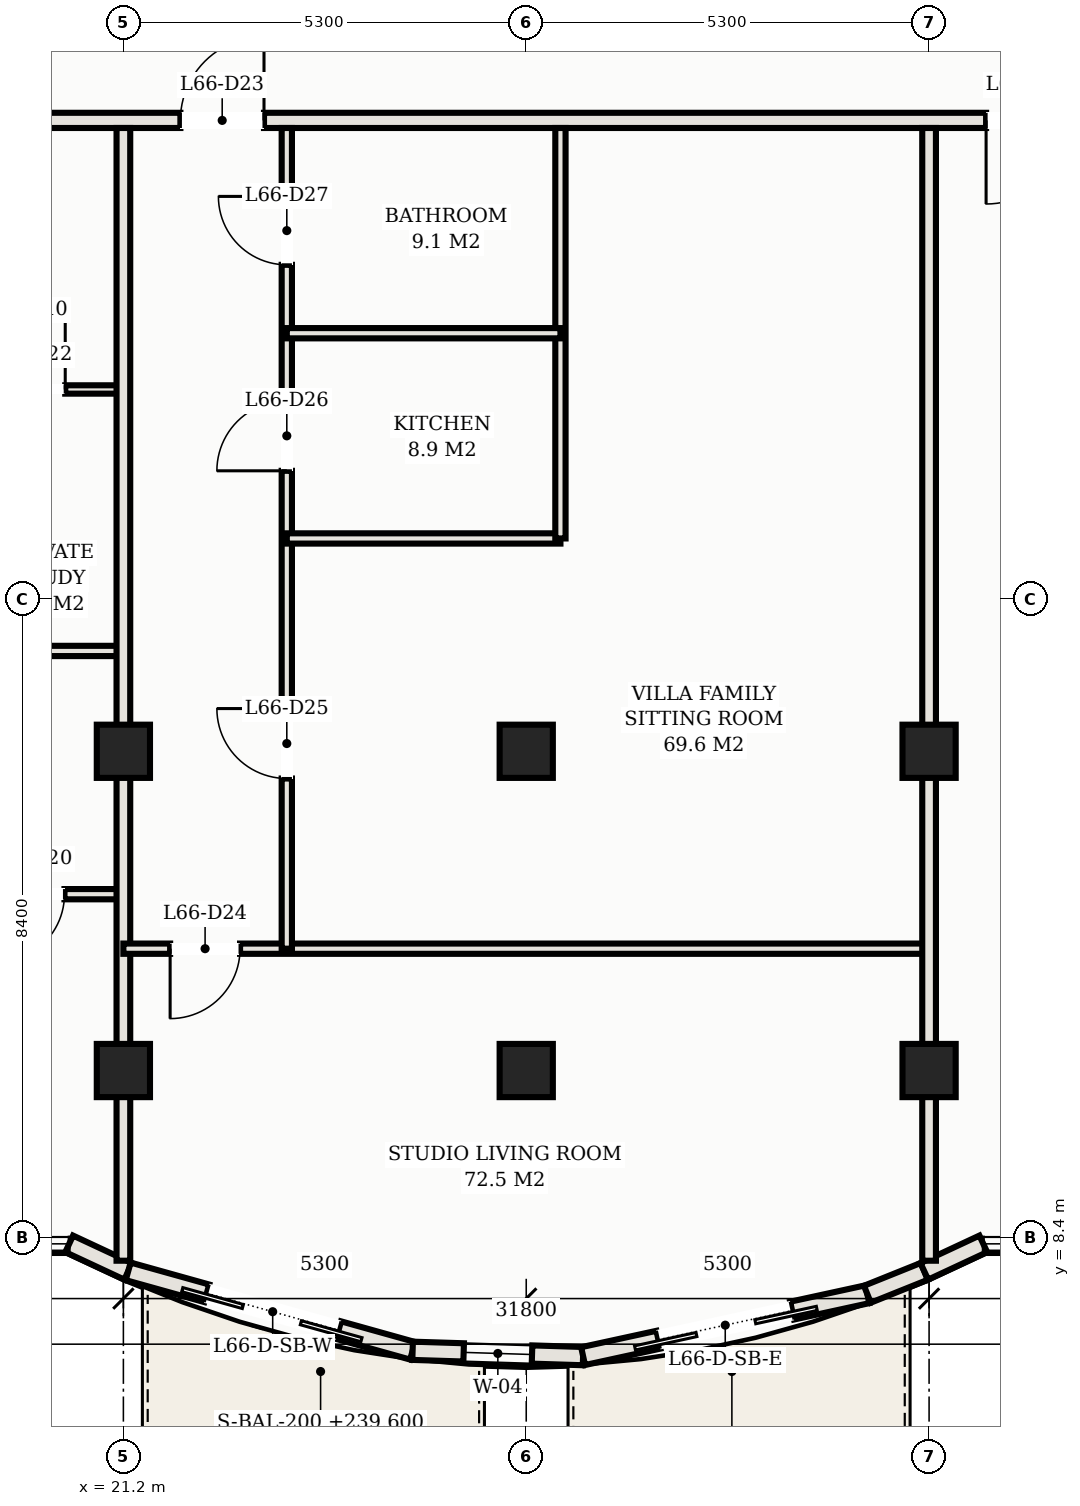
"""IFC4 building model, lengths in metres.
Left out: names, types, materials, properties, quantities, classifications, styles, units other than length and angle.
Written with IfcOpenShell. Run it as: python <this file> out.ifc"""

import sys

from ifc_helpers import new_model, si_unit, direction, frame, frame_2d, origin, origin_2d, place, context, subcontext, project, spatial, rectangle, hollow_rectangle, extrude, element, fill, save


model = new_model("IFC4")
c1 = context("Model", 3, precision=1e-05, world=origin(), true_north=direction((0.0, 1.0)))
c2 = subcontext(c1, "Body", "Model", "MODEL_VIEW")
j1 = project(units=[si_unit("LENGTHUNIT", "METRE"), si_unit("PLANEANGLEUNIT", "RADIAN")], contexts=[c1])
p1 = place(None, origin())
s1 = spatial("IfcSite", under=j1, at=p1, CompositionType="ELEMENT")
p2 = place(p1, origin())
s2 = spatial("IfcBuilding", under=s1, at=p2, CompositionType="ELEMENT")
p3 = place(p2, frame((0.0, 0.0, 239.6)))
s3 = spatial("IfcBuildingStorey", under=s2, at=p3, CompositionType="ELEMENT", Elevation=239.6)
for number, where, z_axis, x_axis in (
    (1, (21.2, 14.8, 0.0), (0.0, 0.0, 1.0), (1.0, 0.0, 0.0)),
    (2, (21.2, 10.6, 0.0), (0.0, 0.0, 1.0), (1.0, 0.0, 0.0)),
    (3, (26.5, 14.8, 0.0), (0.0, 0.0, 1.0), (1.0, 0.0, 0.0)),
    (4, (26.5, 10.6, 0.0), (0.0, 0.0, 1.0), (1.0, 0.0, 0.0)),
    (5, (31.8, 14.8, 0.0), (0.0, 0.0, 1.0), (1.0, 0.0, 0.0)),
    (6, (31.8, 10.6, 0.0), (0.0, 0.0, 1.0), (1.0, 0.0, 0.0)),
):
    element("IfcColumn", number, at=place(p3, frame(where, z_axis=z_axis, x_axis=x_axis)), inside=s3, PredefinedType="COLUMN", context=c2, shape_type="SweptSolid", body=[
        extrude(hollow_rectangle(XDim=0.7, YDim=0.7, WallThickness=0.025, at=origin_2d()), origin(), (0.0, 0.0, 1.0), 3.3),
    ])
p4 = place(p3, frame((20.487, 8.32, 0.0), z_axis=(0.0, 0.0, 1.0), x_axis=(0.906190424584, -0.422869855147, 0.0)))
e7 = element("IfcWall", 7, at=p4, inside=s3, PredefinedType="SOLIDWALL", context=c2, shape_type="SweptSolid", body=[
    extrude(rectangle(XDim=0.856, YDim=0.24, at=frame_2d((0.428, 0.0))), origin(), (0.0, 0.0, 1.0), 3.11),
])
p5 = place(p3, frame((21.263, 7.958, 0.0), z_axis=(0.0, 0.0, 1.0), x_axis=(0.963152398068, -0.268956238255, 0.0)))
e8 = element("IfcWall", 8, at=p5, inside=s3, PredefinedType="SOLIDWALL", context=c2, shape_type="SweptSolid", body=[
    extrude(rectangle(XDim=3.885, YDim=0.24, at=frame_2d((1.942, 0.0))), origin(), (0.0, 0.0, 1.0), 3.11),
])
p6 = place(p5, frame((1.074, 0.0, 0.0)))
e9 = element("IfcOpeningElement", 9, at=p6, cuts=e8, PredefinedType="OPENING", context=c2, shape_type="SweptSolid", body=[
    extrude(rectangle(XDim=1.8, YDim=2.2, at=frame_2d((0.9, 1.1))), frame((0.0, 0.13, 0.0), z_axis=(0.0, -1.0, 0.0), x_axis=(1.0, 0.0, 0.0)), (0.0, 0.0, 1.0), 0.26),
])
p7 = place(p3, frame((25.005, 6.913, 0.0), z_axis=(0.0, 0.0, 1.0), x_axis=(0.99951250052, -0.031221167572, 0.0)))
e10 = element("IfcWall", 10, at=p7, inside=s3, PredefinedType="SOLIDWALL", context=c2, shape_type="SweptSolid", body=[
    extrude(rectangle(XDim=2.244, YDim=0.24, at=frame_2d((1.122, 0.0))), origin(), (0.0, 0.0, 1.0), 3.11),
])
p8 = place(p7, frame((0.672, 0.0, 0.75)))
e11 = element("IfcOpeningElement", 11, at=p8, cuts=e10, PredefinedType="OPENING", context=c2, shape_type="SweptSolid", body=[
    extrude(rectangle(XDim=0.9, YDim=1.2, at=frame_2d((0.45, 0.6))), frame((0.0, 0.13, 0.0), z_axis=(0.0, -1.0, 0.0), x_axis=(1.0, 0.0, 0.0)), (0.0, 0.0, 1.0), 0.26),
])
p9 = place(p3, frame((27.248, 6.843, 0.0), z_axis=(0.0, 0.0, 1.0), x_axis=(0.977126252677, 0.212660025225, 0.0)))
e12 = element("IfcWall", 12, at=p9, inside=s3, PredefinedType="SOLIDWALL", context=c2, shape_type="SweptSolid", body=[
    extrude(rectangle(XDim=3.828, YDim=0.24, at=frame_2d((1.914, 0.0))), origin(), (0.0, 0.0, 1.0), 3.11),
])
p10 = place(p9, frame((1.014, 0.0, 0.0)))
e13 = element("IfcOpeningElement", 13, at=p10, cuts=e12, PredefinedType="OPENING", context=c2, shape_type="SweptSolid", body=[
    extrude(rectangle(XDim=1.8, YDim=2.2, at=frame_2d((0.9, 1.1))), frame((0.0, 0.13, 0.0), z_axis=(0.0, -1.0, 0.0), x_axis=(1.0, 0.0, 0.0)), (0.0, 0.0, 1.0), 0.26),
])
p11 = place(p3, frame((30.988, 7.657, 0.0), z_axis=(0.0, 0.0, 1.0), x_axis=(0.927870589467, 0.372902358805, 0.0)))
e14 = element("IfcWall", 14, at=p11, inside=s3, PredefinedType="SOLIDWALL", context=c2, shape_type="SweptSolid", body=[
    extrude(rectangle(XDim=0.807, YDim=0.24, at=frame_2d((0.404, 0.0))), origin(), (0.0, 0.0, 1.0), 3.11),
])
p12 = place(p3, frame((31.737, 7.958, 0.0), z_axis=(0.0, 0.0, 1.0), x_axis=(0.906190424584, 0.422869855147, 0.0)))
e15 = element("IfcWall", 15, at=p12, inside=s3, PredefinedType="SOLIDWALL", context=c2, shape_type="SweptSolid", body=[
    extrude(rectangle(XDim=0.856, YDim=0.24, at=frame_2d((0.428, 0.0))), origin(), (0.0, 0.0, 1.0), 3.11),
])
p13 = place(p3, frame((8.6, 23.1, 0.0), z_axis=(0.0, 0.0, 1.0), x_axis=(1.0, 0.0, 0.0)))
e16 = element("IfcWall", 16, at=p13, inside=s3, PredefinedType="PARTITIONING", context=c2, shape_type="SweptSolid", body=[
    extrude(rectangle(XDim=35.8, YDim=0.2, at=frame_2d((17.9, 0.0))), origin(), (0.0, 0.0, 1.0), 2.45),
])
p14 = place(p13, frame((2.75, 0.0, 0.0)))
e17 = element("IfcOpeningElement", 17, at=p14, cuts=e16, PredefinedType="OPENING", context=c2, shape_type="SweptSolid", body=[
    extrude(rectangle(XDim=1.1, YDim=2.25, at=frame_2d((0.55, 1.125))), frame((0.0, 0.11, 0.0), z_axis=(0.0, -1.0, 0.0), x_axis=(1.0, 0.0, 0.0)), (0.0, 0.0, 1.0), 0.22),
])
p15 = place(p13, frame((13.35, 0.0, 0.0)))
e18 = element("IfcOpeningElement", 18, at=p15, cuts=e16, PredefinedType="OPENING", context=c2, shape_type="SweptSolid", body=[
    extrude(rectangle(XDim=1.1, YDim=2.25, at=frame_2d((0.55, 1.125))), frame((0.0, 0.11, 0.0), z_axis=(0.0, -1.0, 0.0), x_axis=(1.0, 0.0, 0.0)), (0.0, 0.0, 1.0), 0.22),
])
p16 = place(p13, frame((23.95, 0.0, 0.0)))
e19 = element("IfcOpeningElement", 19, at=p16, cuts=e16, PredefinedType="OPENING", context=c2, shape_type="SweptSolid", body=[
    extrude(rectangle(XDim=1.1, YDim=2.25, at=frame_2d((0.55, 1.125))), frame((0.0, 0.11, 0.0), z_axis=(0.0, -1.0, 0.0), x_axis=(1.0, 0.0, 0.0)), (0.0, 0.0, 1.0), 0.22),
])
p17 = place(p13, frame((29.25, 0.0, 0.0)))
e20 = element("IfcOpeningElement", 20, at=p17, cuts=e16, PredefinedType="OPENING", context=c2, shape_type="SweptSolid", body=[
    extrude(rectangle(XDim=1.1, YDim=2.25, at=frame_2d((0.55, 1.125))), frame((0.0, 0.11, 0.0), z_axis=(0.0, -1.0, 0.0), x_axis=(1.0, 0.0, 0.0)), (0.0, 0.0, 1.0), 0.22),
])
p18 = place(p13, frame((0.505, 0.0, 0.0)))
e21 = element("IfcOpeningElement", 21, at=p18, cuts=e16, PredefinedType="OPENING", context=c2, shape_type="SweptSolid", body=[
    extrude(rectangle(XDim=0.9, YDim=2.15, at=frame_2d((0.45, 1.075))), frame((0.0, 0.11, 0.0), z_axis=(0.0, -1.0, 0.0), x_axis=(1.0, 0.0, 0.0)), (0.0, 0.0, 1.0), 0.22),
])
p19 = place(p13, frame((34.395, 0.0, 0.0)))
e22 = element("IfcOpeningElement", 22, at=p19, cuts=e16, PredefinedType="OPENING", context=c2, shape_type="SweptSolid", body=[
    extrude(rectangle(XDim=0.9, YDim=2.15, at=frame_2d((0.45, 1.075))), frame((0.0, 0.11, 0.0), z_axis=(0.0, -1.0, 0.0), x_axis=(1.0, 0.0, 0.0)), (0.0, 0.0, 1.0), 0.22),
])
p20 = place(p3, frame((16.6, 12.92, 0.0), z_axis=(0.0, 0.0, 1.0), x_axis=(1.0, 0.0, 0.0)))
e23 = element("IfcWall", 23, at=p20, inside=s3, PredefinedType="PARTITIONING", context=c2, shape_type="SweptSolid", body=[
    extrude(rectangle(XDim=4.6, YDim=0.135, at=frame_2d((2.3, 0.0))), origin(), (0.0, 0.0, 1.0), 2.45),
])
p21 = place(p20, frame((0.6, 0.0, 0.0)))
e24 = element("IfcOpeningElement", 24, at=p21, cuts=e23, PredefinedType="OPENING", context=c2, shape_type="SweptSolid", body=[
    extrude(rectangle(XDim=0.95, YDim=2.15, at=frame_2d((0.475, 1.075))), frame((0.0, 0.078, 0.0), z_axis=(0.0, -1.0, 0.0), x_axis=(1.0, 0.0, 0.0)), (0.0, 0.0, 1.0), 0.155),
])
p22 = place(p20, frame((2.925, 0.0, 0.0)))
e25 = element("IfcOpeningElement", 25, at=p22, cuts=e23, PredefinedType="OPENING", context=c2, shape_type="SweptSolid", body=[
    extrude(rectangle(XDim=0.9, YDim=2.15, at=frame_2d((0.45, 1.075))), frame((0.0, 0.078, 0.0), z_axis=(0.0, -1.0, 0.0), x_axis=(1.0, 0.0, 0.0)), (0.0, 0.0, 1.0), 0.155),
])
p23 = place(p3, frame((18.75, 16.12, 0.0), z_axis=(0.0, 0.0, 1.0), x_axis=(1.0, 0.0, 0.0)))
e26 = element("IfcWall", 26, at=p23, inside=s3, PredefinedType="PARTITIONING", context=c2, shape_type="SweptSolid", body=[
    extrude(rectangle(XDim=2.45, YDim=0.135, at=frame_2d((1.225, 0.0))), origin(), (0.0, 0.0, 1.0), 2.45),
])
p24 = place(p3, frame((18.75, 19.56, 0.0), z_axis=(0.0, 0.0, 1.0), x_axis=(1.0, 0.0, 0.0)))
e27 = element("IfcWall", 27, at=p24, inside=s3, PredefinedType="MOVABLE", context=c2, shape_type="SweptSolid", body=[
    extrude(rectangle(XDim=2.45, YDim=0.11, at=frame_2d((1.225, 0.0))), origin(), (0.0, 0.0, 1.0), 2.45),
])
p25 = place(p24, frame((0.765, 0.0, 0.0)))
e28 = element("IfcOpeningElement", 28, at=p25, cuts=e27, PredefinedType="OPENING", context=c2, shape_type="SweptSolid", body=[
    extrude(rectangle(XDim=0.92, YDim=2.15, at=frame_2d((0.46, 1.075))), frame((0.0, 0.065, 0.0), z_axis=(0.0, -1.0, 0.0), x_axis=(1.0, 0.0, 0.0)), (0.0, 0.0, 1.0), 0.13),
])
p26 = place(p3, frame((21.2, 8.098, 0.0), z_axis=(0.0, 0.0, 1.0), x_axis=(0.0, 1.0, 0.0)))
e29 = element("IfcWall", 29, at=p26, inside=s3, PredefinedType="PARTITIONING", context=c2, shape_type="SweptSolid", body=[
    extrude(rectangle(XDim=14.902, YDim=0.18, at=frame_2d((7.451, 0.0))), origin(), (0.0, 0.0, 1.0), 2.45),
])
p27 = place(p3, frame((21.2, 12.203, 0.0), z_axis=(0.0, 0.0, 1.0), x_axis=(1.0, 0.0, 0.0)))
e30 = element("IfcWall", 30, at=p27, inside=s3, PredefinedType="PARTITIONING", context=c2, shape_type="SweptSolid", body=[
    extrude(rectangle(XDim=10.6, YDim=0.135, at=frame_2d((5.3, 0.0))), origin(), (0.0, 0.0, 1.0), 2.45),
])
p28 = place(p27, frame((0.615, 0.0, 0.0)))
e31 = element("IfcOpeningElement", 31, at=p28, cuts=e30, PredefinedType="OPENING", context=c2, shape_type="SweptSolid", body=[
    extrude(rectangle(XDim=0.92, YDim=2.15, at=frame_2d((0.46, 1.075))), frame((0.0, 0.078, 0.0), z_axis=(0.0, -1.0, 0.0), x_axis=(1.0, 0.0, 0.0)), (0.0, 0.0, 1.0), 0.155),
])
p29 = place(p3, frame((23.35, 12.203, 0.0), z_axis=(0.0, 0.0, 1.0), x_axis=(0.0, 1.0, 0.0)))
e32 = element("IfcWall", 32, at=p29, inside=s3, PredefinedType="PARTITIONING", context=c2, shape_type="SweptSolid", body=[
    extrude(rectangle(XDim=10.797, YDim=0.135, at=frame_2d((5.398, 0.0))), origin(), (0.0, 0.0, 1.0), 2.45),
])
p30 = place(p29, frame((2.239, 0.0, 0.0)))
e33 = element("IfcOpeningElement", 33, at=p30, cuts=e32, PredefinedType="OPENING", context=c2, shape_type="SweptSolid", body=[
    extrude(rectangle(XDim=0.92, YDim=2.15, at=frame_2d((0.46, 1.075))), frame((0.0, 0.078, 0.0), z_axis=(0.0, -1.0, 0.0), x_axis=(1.0, 0.0, 0.0)), (0.0, 0.0, 1.0), 0.155),
])
p31 = place(p29, frame((6.287, 0.0, 0.0)))
e34 = element("IfcOpeningElement", 34, at=p31, cuts=e32, PredefinedType="OPENING", context=c2, shape_type="SweptSolid", body=[
    extrude(rectangle(XDim=0.92, YDim=2.15, at=frame_2d((0.46, 1.075))), frame((0.0, 0.078, 0.0), z_axis=(0.0, -1.0, 0.0), x_axis=(1.0, 0.0, 0.0)), (0.0, 0.0, 1.0), 0.155),
])
p32 = place(p29, frame((8.997, 0.0, 0.0)))
e35 = element("IfcOpeningElement", 35, at=p32, cuts=e32, PredefinedType="OPENING", context=c2, shape_type="SweptSolid", body=[
    extrude(rectangle(XDim=0.9, YDim=2.15, at=frame_2d((0.45, 1.075))), frame((0.0, 0.078, 0.0), z_axis=(0.0, -1.0, 0.0), x_axis=(1.0, 0.0, 0.0)), (0.0, 0.0, 1.0), 0.155),
])
p33 = place(p3, frame((23.35, 17.6, 0.0), z_axis=(0.0, 0.0, 1.0), x_axis=(1.0, 0.0, 0.0)))
e36 = element("IfcWall", 36, at=p33, inside=s3, PredefinedType="PARTITIONING", context=c2, shape_type="SweptSolid", body=[
    extrude(rectangle(XDim=3.6, YDim=0.135, at=frame_2d((1.8, 0.0))), origin(), (0.0, 0.0, 1.0), 2.45),
])
p34 = place(p3, frame((26.95, 17.6, 0.0), z_axis=(0.0, 0.0, 1.0), x_axis=(0.0, 1.0, 0.0)))
e37 = element("IfcWall", 37, at=p34, inside=s3, PredefinedType="PARTITIONING", context=c2, shape_type="SweptSolid", body=[
    extrude(rectangle(XDim=5.4, YDim=0.135, at=frame_2d((2.7, 0.0))), origin(), (0.0, 0.0, 1.0), 2.45),
])
p35 = place(p3, frame((23.35, 20.3, 0.0), z_axis=(0.0, 0.0, 1.0), x_axis=(1.0, 0.0, 0.0)))
e38 = element("IfcWall", 38, at=p35, inside=s3, PredefinedType="PARTITIONING", context=c2, shape_type="SweptSolid", body=[
    extrude(rectangle(XDim=3.6, YDim=0.135, at=frame_2d((1.8, 0.0))), origin(), (0.0, 0.0, 1.0), 2.45),
])
p36 = place(p3, frame((31.8, 8.098, 0.0), z_axis=(0.0, 0.0, 1.0), x_axis=(0.0, 1.0, 0.0)))
e39 = element("IfcWall", 39, at=p36, inside=s3, PredefinedType="PARTITIONING", context=c2, shape_type="SweptSolid", body=[
    extrude(rectangle(XDim=14.902, YDim=0.18, at=frame_2d((7.451, 0.0))), origin(), (0.0, 0.0, 1.0), 2.45),
])
p37 = place(p6, frame((1.8, 0.0, 0.0), z_axis=(0.0, 0.0, 1.0), x_axis=(-1.0, 0.0, 0.0)))
e40 = element("IfcDoor", 40, at=p37, inside=s3, OperationType="DOUBLE_DOOR_SLIDING", PredefinedType="DOOR", context=c2, shape_type="SweptSolid", body=[
    extrude(rectangle(XDim=1.8, YDim=2.2, at=frame_2d((0.9, 1.1))), frame((0.0, 0.025, 0.0), z_axis=(0.0, -1.0, 0.0), x_axis=(1.0, 0.0, 0.0)), (0.0, 0.0, 1.0), 0.05),
])
fill(e9, e40)
p38 = place(p8, origin())
e41 = element("IfcWindow", 41, at=p38, inside=s3, PartitioningType="SINGLE_PANEL", PredefinedType="WINDOW", context=c2, shape_type="SweptSolid", body=[
    extrude(rectangle(XDim=0.9, YDim=1.2, at=frame_2d((0.45, 0.6))), frame((0.0, 0.03, 0.0), z_axis=(0.0, -1.0, 0.0), x_axis=(1.0, 0.0, 0.0)), (0.0, 0.0, 1.0), 0.06),
])
fill(e11, e41)
p39 = place(p10, frame((1.8, 0.0, 0.0), z_axis=(0.0, 0.0, 1.0), x_axis=(-1.0, 0.0, 0.0)))
e42 = element("IfcDoor", 42, at=p39, inside=s3, OperationType="DOUBLE_DOOR_SLIDING", PredefinedType="DOOR", context=c2, shape_type="SweptSolid", body=[
    extrude(rectangle(XDim=1.8, YDim=2.2, at=frame_2d((0.9, 1.1))), frame((0.0, 0.025, 0.0), z_axis=(0.0, -1.0, 0.0), x_axis=(1.0, 0.0, 0.0)), (0.0, 0.0, 1.0), 0.05),
])
fill(e13, e42)
p40 = place(p22, frame((0.9, 0.0, 0.0), z_axis=(0.0, 0.0, 1.0), x_axis=(-1.0, 0.0, 0.0)))
e43 = element("IfcDoor", 43, at=p40, inside=s3, OperationType="SINGLE_SWING_RIGHT", PredefinedType="DOOR", context=c2, shape_type="SweptSolid", body=[
    extrude(rectangle(XDim=0.9, YDim=2.15, at=frame_2d((0.45, 1.075))), frame((0.0, 0.025, 0.0), z_axis=(0.0, -1.0, 0.0), x_axis=(1.0, 0.0, 0.0)), (0.0, 0.0, 1.0), 0.05),
])
fill(e25, e43)
p41 = place(p25, origin())
e44 = element("IfcDoor", 44, at=p41, inside=s3, OperationType="SINGLE_SWING_RIGHT", PredefinedType="DOOR", context=c2, shape_type="SweptSolid", body=[
    extrude(rectangle(XDim=0.92, YDim=2.15, at=frame_2d((0.46, 1.075))), frame((0.0, 0.025, 0.0), z_axis=(0.0, -1.0, 0.0), x_axis=(1.0, 0.0, 0.0)), (0.0, 0.0, 1.0), 0.05),
])
fill(e28, e44)
p42 = place(p15, origin())
e45 = element("IfcDoor", 45, at=p42, inside=s3, OperationType="SINGLE_SWING_RIGHT", PredefinedType="DOOR", context=c2, shape_type="SweptSolid", body=[
    extrude(rectangle(XDim=1.1, YDim=2.25, at=frame_2d((0.55, 1.125))), frame((0.0, 0.025, 0.0), z_axis=(0.0, -1.0, 0.0), x_axis=(1.0, 0.0, 0.0)), (0.0, 0.0, 1.0), 0.05),
])
fill(e18, e45)
p43 = place(p28, frame((0.92, 0.0, 0.0), z_axis=(0.0, 0.0, 1.0), x_axis=(-1.0, 0.0, 0.0)))
e46 = element("IfcDoor", 46, at=p43, inside=s3, OperationType="SINGLE_SWING_RIGHT", PredefinedType="DOOR", context=c2, shape_type="SweptSolid", body=[
    extrude(rectangle(XDim=0.92, YDim=2.15, at=frame_2d((0.46, 1.075))), frame((0.0, 0.025, 0.0), z_axis=(0.0, -1.0, 0.0), x_axis=(1.0, 0.0, 0.0)), (0.0, 0.0, 1.0), 0.05),
])
fill(e31, e46)
p44 = place(p30, origin())
e47 = element("IfcDoor", 47, at=p44, inside=s3, OperationType="SINGLE_SWING_RIGHT", PredefinedType="DOOR", context=c2, shape_type="SweptSolid", body=[
    extrude(rectangle(XDim=0.92, YDim=2.15, at=frame_2d((0.46, 1.075))), frame((0.0, 0.025, 0.0), z_axis=(0.0, -1.0, 0.0), x_axis=(1.0, 0.0, 0.0)), (0.0, 0.0, 1.0), 0.05),
])
fill(e33, e47)
p45 = place(p31, origin())
e48 = element("IfcDoor", 48, at=p45, inside=s3, OperationType="SINGLE_SWING_LEFT", PredefinedType="DOOR", context=c2, shape_type="SweptSolid", body=[
    extrude(rectangle(XDim=0.92, YDim=2.15, at=frame_2d((0.46, 1.075))), frame((0.0, 0.025, 0.0), z_axis=(0.0, -1.0, 0.0), x_axis=(1.0, 0.0, 0.0)), (0.0, 0.0, 1.0), 0.05),
])
fill(e34, e48)
p46 = place(p32, origin())
e49 = element("IfcDoor", 49, at=p46, inside=s3, OperationType="SINGLE_SWING_RIGHT", PredefinedType="DOOR", context=c2, shape_type="SweptSolid", body=[
    extrude(rectangle(XDim=0.9, YDim=2.15, at=frame_2d((0.45, 1.075))), frame((0.0, 0.025, 0.0), z_axis=(0.0, -1.0, 0.0), x_axis=(1.0, 0.0, 0.0)), (0.0, 0.0, 1.0), 0.05),
])
fill(e35, e49)
p47 = place(p16, frame((1.1, 0.0, 0.0), z_axis=(0.0, 0.0, 1.0), x_axis=(-1.0, 0.0, 0.0)))
e50 = element("IfcDoor", 50, at=p47, inside=s3, OperationType="SINGLE_SWING_RIGHT", PredefinedType="DOOR", context=c2, shape_type="SweptSolid", body=[
    extrude(rectangle(XDim=1.1, YDim=2.25, at=frame_2d((0.55, 1.125))), frame((0.0, 0.025, 0.0), z_axis=(0.0, -1.0, 0.0), x_axis=(1.0, 0.0, 0.0)), (0.0, 0.0, 1.0), 0.05),
])
fill(e19, e50)
save(model, sys.argv[1])
